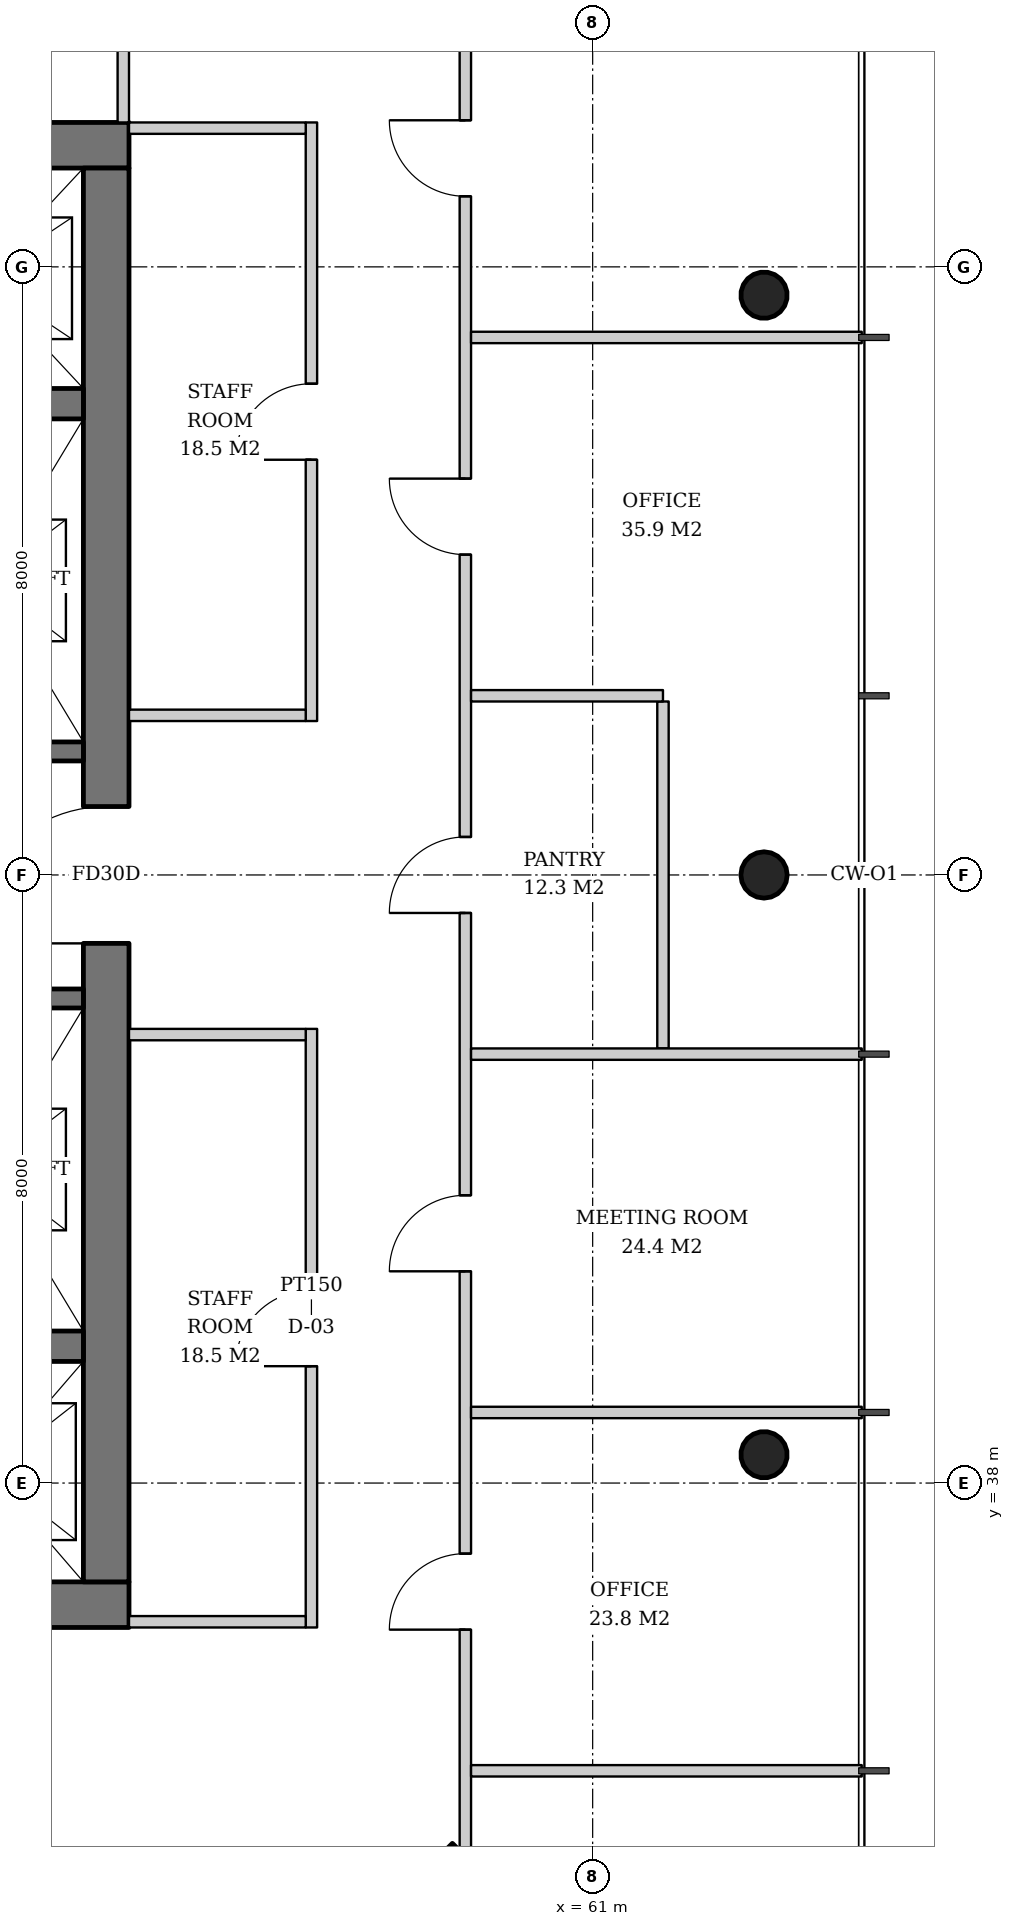
"""IFC4 building model, lengths in metres.
Left out: names, types, materials, properties, quantities, classifications, styles, units other than length and angle.
Written with IfcOpenShell. Run it as: python <this file> out.ifc"""

import sys

from ifc_helpers import new_model, si_unit, direction, frame, frame_2d, origin, origin_2d, place, context, subcontext, project, spatial, rectangle, hollow_circle, extrude, element, fill, save


model = new_model("IFC4")
c1 = context("Model", 3, precision=1e-05, world=origin(), true_north=direction((0.0, 1.0)))
c2 = subcontext(c1, "Body", "Model", "MODEL_VIEW")
j1 = project(units=[si_unit("LENGTHUNIT", "METRE"), si_unit("PLANEANGLEUNIT", "RADIAN")], contexts=[c1])
p1 = place(None, origin())
s1 = spatial("IfcSite", under=j1, at=p1, CompositionType="ELEMENT")
p2 = place(p1, origin())
s2 = spatial("IfcBuilding", under=s1, at=p2, CompositionType="ELEMENT")
p3 = place(p2, frame((0.0, 0.0, 199.6)))
s3 = spatial("IfcBuildingStorey", under=s2, at=p3, CompositionType="ELEMENT", Elevation=199.6)
p4 = place(p3, frame((63.293, 38.354, 0.0), z_axis=(-0.031976461511, 0.015988230756, 0.999360736865), x_axis=(-0.4472135955, -0.894427191, 0.0)))
e1 = element("IfcColumn", 1, at=p4, inside=s3, PredefinedType="COLUMN", context=c2, shape_type="SweptSolid", body=[
    extrude(hollow_circle(Radius=0.305, WallThickness=0.025, at=origin_2d()), origin(), (0.0, 0.0, 1.0), 3.802),
])
p5 = place(p3, frame((63.293, 46.0, 0.0), z_axis=(-0.031980549263, 0.0, 0.999488491414), x_axis=(0.0, -1.0, 0.0)))
e2 = element("IfcColumn", 2, at=p5, inside=s3, PredefinedType="COLUMN", context=c2, shape_type="SweptSolid", body=[
    extrude(hollow_circle(Radius=0.305, WallThickness=0.025, at=origin_2d()), origin(), (0.0, 0.0, 1.0), 3.802),
])
p6 = place(p3, frame((63.293, 53.646, 0.0), z_axis=(-0.031976461511, -0.015988230756, 0.999360736865), x_axis=(0.4472135955, -0.894427191, 0.0)))
e3 = element("IfcColumn", 3, at=p6, inside=s3, PredefinedType="COLUMN", context=c2, shape_type="SweptSolid", body=[
    extrude(hollow_circle(Radius=0.305, WallThickness=0.025, at=origin_2d()), origin(), (0.0, 0.0, 1.0), 3.802),
])
p7 = place(p3, frame((59.193, 31.807, 0.0), z_axis=(-0.031900153262, 0.031900153262, 0.998981861919), x_axis=(-0.707106781187, -0.707106781187, 0.0)))
e4 = element("IfcColumn", 4, at=p7, inside=s3, PredefinedType="COLUMN", context=c2, shape_type="SweptSolid", body=[
    extrude(rectangle(XDim=2.0, YDim=2.0, at=origin_2d()), origin(), (0.0, 0.0, 1.0), 3.804),
])
p8 = place(p3, frame((35.1, 36.4, 0.0), z_axis=(0.0, 0.0, 1.0), x_axis=(1.0, 0.0, 0.0)))
e5 = element("IfcWall", 5, at=p8, inside=s3, PredefinedType="SHEAR", context=c2, shape_type="SweptSolid", body=[
    extrude(rectangle(XDim=19.8, YDim=0.6, at=frame_2d((9.9, 0.0))), origin(), (0.0, 0.0, 1.0), 3.8),
])
p9 = place(p8, frame((3.9, 0.0, 0.0)))
e6 = element("IfcOpeningElement", 6, at=p9, cuts=e5, PredefinedType="OPENING", context=c2, shape_type="SweptSolid", body=[
    extrude(rectangle(XDim=1.0, YDim=2.1, at=frame_2d((0.5, 1.05))), frame((0.0, 0.31, 0.0), z_axis=(0.0, -1.0, 0.0), x_axis=(1.0, 0.0, 0.0)), (0.0, 0.0, 1.0), 0.62),
])
p10 = place(p8, frame((15.35, 0.0, 0.0)))
e7 = element("IfcOpeningElement", 7, at=p10, cuts=e5, PredefinedType="OPENING", context=c2, shape_type="SweptSolid", body=[
    extrude(rectangle(XDim=1.0, YDim=2.1, at=frame_2d((0.5, 1.05))), frame((0.0, 0.31, 0.0), z_axis=(0.0, -1.0, 0.0), x_axis=(1.0, 0.0, 0.0)), (0.0, 0.0, 1.0), 0.62),
])
p11 = place(p3, frame((35.1, 55.6, 0.0), z_axis=(0.0, 0.0, 1.0), x_axis=(1.0, 0.0, 0.0)))
e8 = element("IfcWall", 8, at=p11, inside=s3, PredefinedType="SHEAR", context=c2, shape_type="SweptSolid", body=[
    extrude(rectangle(XDim=19.8, YDim=0.6, at=frame_2d((9.9, 0.0))), origin(), (0.0, 0.0, 1.0), 3.8),
])
p12 = place(p11, frame((14.54, 0.0, 0.0)))
e9 = element("IfcOpeningElement", 9, at=p12, cuts=e8, PredefinedType="OPENING", context=c2, shape_type="SweptSolid", body=[
    extrude(rectangle(XDim=1.0, YDim=2.1, at=frame_2d((0.5, 1.05))), frame((0.0, 0.31, 0.0), z_axis=(0.0, -1.0, 0.0), x_axis=(1.0, 0.0, 0.0)), (0.0, 0.0, 1.0), 0.62),
])
p13 = place(p11, frame((1.8, 0.0, 0.0)))
e10 = element("IfcOpeningElement", 10, at=p13, cuts=e8, PredefinedType="OPENING", context=c2, shape_type="SweptSolid", body=[
    extrude(rectangle(XDim=1.0, YDim=2.1, at=frame_2d((0.5, 1.05))), frame((0.0, 0.31, 0.0), z_axis=(0.0, -1.0, 0.0), x_axis=(1.0, 0.0, 0.0)), (0.0, 0.0, 1.0), 0.62),
])
p14 = place(p11, frame((3.727, 0.0, 0.0)))
e11 = element("IfcOpeningElement", 11, at=p14, cuts=e8, PredefinedType="OPENING", context=c2, shape_type="SweptSolid", body=[
    extrude(rectangle(XDim=1.0, YDim=2.1, at=frame_2d((0.5, 1.05))), frame((0.0, 0.31, 0.0), z_axis=(0.0, -1.0, 0.0), x_axis=(1.0, 0.0, 0.0)), (0.0, 0.0, 1.0), 0.62),
])
p15 = place(p3, frame((54.6, 36.7, 0.0), z_axis=(0.0, 0.0, 1.0), x_axis=(0.0, 1.0, 0.0)))
e12 = element("IfcWall", 12, at=p15, inside=s3, PredefinedType="SHEAR", context=c2, shape_type="SweptSolid", body=[
    extrude(rectangle(XDim=18.6, YDim=0.6, at=frame_2d((9.3, 0.0))), origin(), (0.0, 0.0, 1.0), 3.8),
])
p16 = place(p15, frame((8.4, 0.0, 0.0)))
e13 = element("IfcOpeningElement", 13, at=p16, cuts=e12, PredefinedType="OPENING", context=c2, shape_type="SweptSolid", body=[
    extrude(rectangle(XDim=1.8, YDim=2.4, at=frame_2d((0.9, 1.2))), frame((0.0, 0.31, 0.0), z_axis=(0.0, -1.0, 0.0), x_axis=(1.0, 0.0, 0.0)), (0.0, 0.0, 1.0), 0.62),
])
for number, where, z_axis, x_axis in (
    (14, (35.7, 39.8, 0.0), (0.0, 0.0, 1.0), (1.0, 0.0, 0.0)),
    (15, (35.7, 52.2, 0.0), (0.0, 0.0, 1.0), (1.0, 0.0, 0.0)),
):
    element("IfcWall", number, at=place(p3, frame(where, z_axis=z_axis, x_axis=x_axis)), inside=s3, PredefinedType="SHEAR", context=c2, shape_type="SweptSolid", body=[
        extrude(rectangle(XDim=18.6, YDim=0.4, at=frame_2d((9.3, 0.0))), origin(), (0.0, 0.0, 1.0), 3.8),
    ])
for number, where, z_axis, x_axis in (
    (16, (48.93, 47.625, 0.0), (0.0, 0.0, 1.0), (1.0, 0.0, 0.0)),
    (17, (48.93, 44.375, 0.0), (0.0, 0.0, 1.0), (1.0, 0.0, 0.0)),
):
    element("IfcWall", number, at=place(p3, frame(where, z_axis=z_axis, x_axis=x_axis)), inside=s3, PredefinedType="SHEAR", context=c2, shape_type="SweptSolid", body=[
        extrude(rectangle(XDim=5.37, YDim=0.25, at=frame_2d((2.685, 0.0))), origin(), (0.0, 0.0, 1.0), 3.8),
    ])
p17 = place(p3, frame((57.3, 36.1, 0.0), z_axis=(0.0, 0.0, 1.0), x_axis=(0.0, 1.0, 0.0)))
e18 = element("IfcWall", 18, at=p17, inside=s3, PredefinedType="PARTITIONING", context=c2, shape_type="SweptSolid", body=[
    extrude(rectangle(XDim=7.875, YDim=0.15, at=frame_2d((3.938, 0.0))), origin(), (0.0, 0.0, 1.0), 2.867),
])
p18 = place(p17, frame((3.438, 0.0, 0.0)))
e19 = element("IfcOpeningElement", 19, at=p18, cuts=e18, PredefinedType="OPENING", context=c2, shape_type="SweptSolid", body=[
    extrude(rectangle(XDim=1.0, YDim=2.1, at=frame_2d((0.5, 1.05))), frame((0.0, 0.085, 0.0), z_axis=(0.0, -1.0, 0.0), x_axis=(1.0, 0.0, 0.0)), (0.0, 0.0, 1.0), 0.17),
])
p19 = place(p3, frame((54.9, 36.175, 0.0), z_axis=(0.0, 0.0, 1.0), x_axis=(1.0, 0.0, 0.0)))
e20 = element("IfcWall", 20, at=p19, inside=s3, PredefinedType="PARTITIONING", context=c2, shape_type="SweptSolid", body=[
    extrude(rectangle(XDim=2.325, YDim=0.15, at=frame_2d((1.163, 0.0))), origin(), (0.0, 0.0, 1.0), 2.867),
])
p20 = place(p3, frame((54.9, 43.9, 0.0), z_axis=(0.0, 0.0, 1.0), x_axis=(1.0, 0.0, 0.0)))
e21 = element("IfcWall", 21, at=p20, inside=s3, PredefinedType="PARTITIONING", context=c2, shape_type="SweptSolid", body=[
    extrude(rectangle(XDim=2.325, YDim=0.15, at=frame_2d((1.163, 0.0))), origin(), (0.0, 0.0, 1.0), 3.62),
])
p21 = place(p3, frame((57.3, 48.025, 0.0), z_axis=(0.0, 0.0, 1.0), x_axis=(0.0, 1.0, 0.0)))
e22 = element("IfcWall", 22, at=p21, inside=s3, PredefinedType="PARTITIONING", context=c2, shape_type="SweptSolid", body=[
    extrude(rectangle(XDim=7.875, YDim=0.15, at=frame_2d((3.938, 0.0))), origin(), (0.0, 0.0, 1.0), 2.867),
])
p22 = place(p21, frame((3.438, 0.0, 0.0)))
e23 = element("IfcOpeningElement", 23, at=p22, cuts=e22, PredefinedType="OPENING", context=c2, shape_type="SweptSolid", body=[
    extrude(rectangle(XDim=1.0, YDim=2.1, at=frame_2d((0.5, 1.05))), frame((0.0, 0.085, 0.0), z_axis=(0.0, -1.0, 0.0), x_axis=(1.0, 0.0, 0.0)), (0.0, 0.0, 1.0), 0.17),
])
p23 = place(p3, frame((54.9, 48.1, 0.0), z_axis=(0.0, 0.0, 1.0), x_axis=(1.0, 0.0, 0.0)))
e24 = element("IfcWall", 24, at=p23, inside=s3, PredefinedType="PARTITIONING", context=c2, shape_type="SweptSolid", body=[
    extrude(rectangle(XDim=2.325, YDim=0.15, at=frame_2d((1.163, 0.0))), origin(), (0.0, 0.0, 1.0), 2.867),
])
p24 = place(p3, frame((54.9, 55.825, 0.0), z_axis=(0.0, 0.0, 1.0), x_axis=(1.0, 0.0, 0.0)))
e25 = element("IfcWall", 25, at=p24, inside=s3, PredefinedType="PARTITIONING", context=c2, shape_type="SweptSolid", body=[
    extrude(rectangle(XDim=2.325, YDim=0.15, at=frame_2d((1.163, 0.0))), origin(), (0.0, 0.0, 1.0), 3.62),
])
p25 = place(p3, frame((54.825, 55.9, 0.0), z_axis=(0.0, 0.0, 1.0), x_axis=(0.0, 1.0, 0.0)))
e26 = element("IfcWall", 26, at=p25, inside=s3, PredefinedType="PARTITIONING", context=c2, shape_type="SweptSolid", body=[
    extrude(rectangle(XDim=2.325, YDim=0.15, at=frame_2d((1.163, 0.0))), origin(), (0.0, 0.0, 1.0), 2.867),
])
p26 = place(p3, frame((61.925, 43.718, 0.0), z_axis=(0.0, 0.0, 1.0), x_axis=(0.0, 1.0, 0.0)))
e27 = element("IfcWall", 27, at=p26, inside=s3, PredefinedType="PARTITIONING", context=c2, shape_type="SweptSolid", body=[
    extrude(rectangle(XDim=4.564, YDim=0.15, at=frame_2d((2.282, 0.0))), origin(), (0.0, 0.0, 1.0), 2.867),
])
p27 = place(p3, frame((59.325, 33.164, 0.0), z_axis=(0.0, 0.0, 1.0), x_axis=(0.0, 1.0, 0.0)))
e28 = element("IfcWall", 28, at=p27, inside=s3, PredefinedType="PARTITIONING", context=c2, shape_type="SweptSolid", body=[
    extrude(rectangle(XDim=25.671, YDim=0.15, at=frame_2d((12.836, 0.0))), origin(), (0.0, 0.0, 1.0), 2.867),
])
p28 = place(p27, frame((2.907, 0.0, 0.0)))
e29 = element("IfcOpeningElement", 29, at=p28, cuts=e28, PredefinedType="OPENING", context=c2, shape_type="SweptSolid", body=[
    extrude(rectangle(XDim=1.0, YDim=2.1, at=frame_2d((0.5, 1.05))), frame((0.0, 0.085, 0.0), z_axis=(0.0, -1.0, 0.0), x_axis=(1.0, 0.0, 0.0)), (0.0, 0.0, 1.0), 0.17),
])
p29 = place(p27, frame((7.622, 0.0, 0.0)))
e30 = element("IfcOpeningElement", 30, at=p29, cuts=e28, PredefinedType="OPENING", context=c2, shape_type="SweptSolid", body=[
    extrude(rectangle(XDim=1.0, YDim=2.1, at=frame_2d((0.5, 1.05))), frame((0.0, 0.085, 0.0), z_axis=(0.0, -1.0, 0.0), x_axis=(1.0, 0.0, 0.0)), (0.0, 0.0, 1.0), 0.17),
])
p30 = place(p27, frame((12.336, 0.0, 0.0)))
e31 = element("IfcOpeningElement", 31, at=p30, cuts=e28, PredefinedType="OPENING", context=c2, shape_type="SweptSolid", body=[
    extrude(rectangle(XDim=1.0, YDim=2.1, at=frame_2d((0.5, 1.05))), frame((0.0, 0.085, 0.0), z_axis=(0.0, -1.0, 0.0), x_axis=(1.0, 0.0, 0.0)), (0.0, 0.0, 1.0), 0.17),
])
p31 = place(p27, frame((17.05, 0.0, 0.0)))
e32 = element("IfcOpeningElement", 32, at=p31, cuts=e28, PredefinedType="OPENING", context=c2, shape_type="SweptSolid", body=[
    extrude(rectangle(XDim=1.0, YDim=2.1, at=frame_2d((0.5, 1.05))), frame((0.0, 0.085, 0.0), z_axis=(0.0, -1.0, 0.0), x_axis=(1.0, 0.0, 0.0)), (0.0, 0.0, 1.0), 0.17),
])
p32 = place(p27, frame((21.764, 0.0, 0.0)))
e33 = element("IfcOpeningElement", 33, at=p32, cuts=e28, PredefinedType="OPENING", context=c2, shape_type="SweptSolid", body=[
    extrude(rectangle(XDim=1.0, YDim=2.1, at=frame_2d((0.5, 1.05))), frame((0.0, 0.085, 0.0), z_axis=(0.0, -1.0, 0.0), x_axis=(1.0, 0.0, 0.0)), (0.0, 0.0, 1.0), 0.17),
])
for number, where, z_axis, x_axis in (
    (34, (59.4, 34.214, 0.0), (0.0, 0.0, 1.0), (1.0, 0.0, 0.0)),
    (35, (59.4, 38.928, 0.0), (0.0, 0.0, 1.0), (1.0, 0.0, 0.0)),
    (36, (59.4, 43.643, 0.0), (0.0, 0.0, 1.0), (1.0, 0.0, 0.0)),
):
    element("IfcWall", number, at=place(p3, frame(where, z_axis=z_axis, x_axis=x_axis)), inside=s3, PredefinedType="PARTITIONING", context=c2, shape_type="SweptSolid", body=[
        extrude(rectangle(XDim=5.14, YDim=0.15, at=frame_2d((2.57, 0.0))), origin(), (0.0, 0.0, 1.0), 3.12),
    ])
p33 = place(p3, frame((59.4, 48.357, 0.0), z_axis=(0.0, 0.0, 1.0), x_axis=(1.0, 0.0, 0.0)))
e37 = element("IfcWall", 37, at=p33, inside=s3, PredefinedType="PARTITIONING", context=c2, shape_type="SweptSolid", body=[
    extrude(rectangle(XDim=2.525, YDim=0.15, at=frame_2d((1.263, 0.0))), origin(), (0.0, 0.0, 1.0), 2.867),
])
p34 = place(p3, frame((59.4, 53.072, 0.0), z_axis=(0.0, 0.0, 1.0), x_axis=(1.0, 0.0, 0.0)))
e38 = element("IfcWall", 38, at=p34, inside=s3, PredefinedType="PARTITIONING", context=c2, shape_type="SweptSolid", body=[
    extrude(rectangle(XDim=5.14, YDim=0.15, at=frame_2d((2.57, 0.0))), origin(), (0.0, 0.0, 1.0), 3.12),
])
p35 = place(p16, origin())
e39 = element("IfcDoor", 39, at=p35, inside=s3, OperationType="DOUBLE_DOOR_SINGLE_SWING", PredefinedType="DOOR", context=c2, shape_type="SweptSolid", body=[
    extrude(rectangle(XDim=1.8, YDim=2.4, at=frame_2d((0.9, 1.2))), frame((0.0, 0.025, 0.0), z_axis=(0.0, -1.0, 0.0), x_axis=(1.0, 0.0, 0.0)), (0.0, 0.0, 1.0), 0.05),
])
fill(e13, e39)
p36 = place(p18, origin())
e40 = element("IfcDoor", 40, at=p36, inside=s3, OperationType="SINGLE_SWING_LEFT", PredefinedType="DOOR", context=c2, shape_type="SweptSolid", body=[
    extrude(rectangle(XDim=1.0, YDim=2.1, at=frame_2d((0.5, 1.05))), frame((0.0, 0.025, 0.0), z_axis=(0.0, -1.0, 0.0), x_axis=(1.0, 0.0, 0.0)), (0.0, 0.0, 1.0), 0.05),
])
fill(e19, e40)
p37 = place(p22, origin())
e41 = element("IfcDoor", 41, at=p37, inside=s3, OperationType="SINGLE_SWING_LEFT", PredefinedType="DOOR", context=c2, shape_type="SweptSolid", body=[
    extrude(rectangle(XDim=1.0, YDim=2.1, at=frame_2d((0.5, 1.05))), frame((0.0, 0.025, 0.0), z_axis=(0.0, -1.0, 0.0), x_axis=(1.0, 0.0, 0.0)), (0.0, 0.0, 1.0), 0.05),
])
fill(e23, e41)
p38 = place(p28, origin())
e42 = element("IfcDoor", 42, at=p38, inside=s3, OperationType="SINGLE_SWING_LEFT", PredefinedType="DOOR", context=c2, shape_type="SweptSolid", body=[
    extrude(rectangle(XDim=1.0, YDim=2.1, at=frame_2d((0.5, 1.05))), frame((0.0, 0.025, 0.0), z_axis=(0.0, -1.0, 0.0), x_axis=(1.0, 0.0, 0.0)), (0.0, 0.0, 1.0), 0.05),
])
fill(e29, e42)
p39 = place(p29, origin())
e43 = element("IfcDoor", 43, at=p39, inside=s3, OperationType="SINGLE_SWING_LEFT", PredefinedType="DOOR", context=c2, shape_type="SweptSolid", body=[
    extrude(rectangle(XDim=1.0, YDim=2.1, at=frame_2d((0.5, 1.05))), frame((0.0, 0.025, 0.0), z_axis=(0.0, -1.0, 0.0), x_axis=(1.0, 0.0, 0.0)), (0.0, 0.0, 1.0), 0.05),
])
fill(e30, e43)
p40 = place(p30, origin())
e44 = element("IfcDoor", 44, at=p40, inside=s3, OperationType="SINGLE_SWING_LEFT", PredefinedType="DOOR", context=c2, shape_type="SweptSolid", body=[
    extrude(rectangle(XDim=1.0, YDim=2.1, at=frame_2d((0.5, 1.05))), frame((0.0, 0.025, 0.0), z_axis=(0.0, -1.0, 0.0), x_axis=(1.0, 0.0, 0.0)), (0.0, 0.0, 1.0), 0.05),
])
fill(e31, e44)
p41 = place(p31, origin())
e45 = element("IfcDoor", 45, at=p41, inside=s3, OperationType="SINGLE_SWING_RIGHT", PredefinedType="DOOR", context=c2, shape_type="SweptSolid", body=[
    extrude(rectangle(XDim=1.0, YDim=2.1, at=frame_2d((0.5, 1.05))), frame((0.0, 0.025, 0.0), z_axis=(0.0, -1.0, 0.0), x_axis=(1.0, 0.0, 0.0)), (0.0, 0.0, 1.0), 0.05),
])
fill(e32, e45)
p42 = place(p32, origin())
e46 = element("IfcDoor", 46, at=p42, inside=s3, OperationType="SINGLE_SWING_RIGHT", PredefinedType="DOOR", context=c2, shape_type="SweptSolid", body=[
    extrude(rectangle(XDim=1.0, YDim=2.1, at=frame_2d((0.5, 1.05))), frame((0.0, 0.025, 0.0), z_axis=(0.0, -1.0, 0.0), x_axis=(1.0, 0.0, 0.0)), (0.0, 0.0, 1.0), 0.05),
])
fill(e33, e46)
save(model, sys.argv[1])
